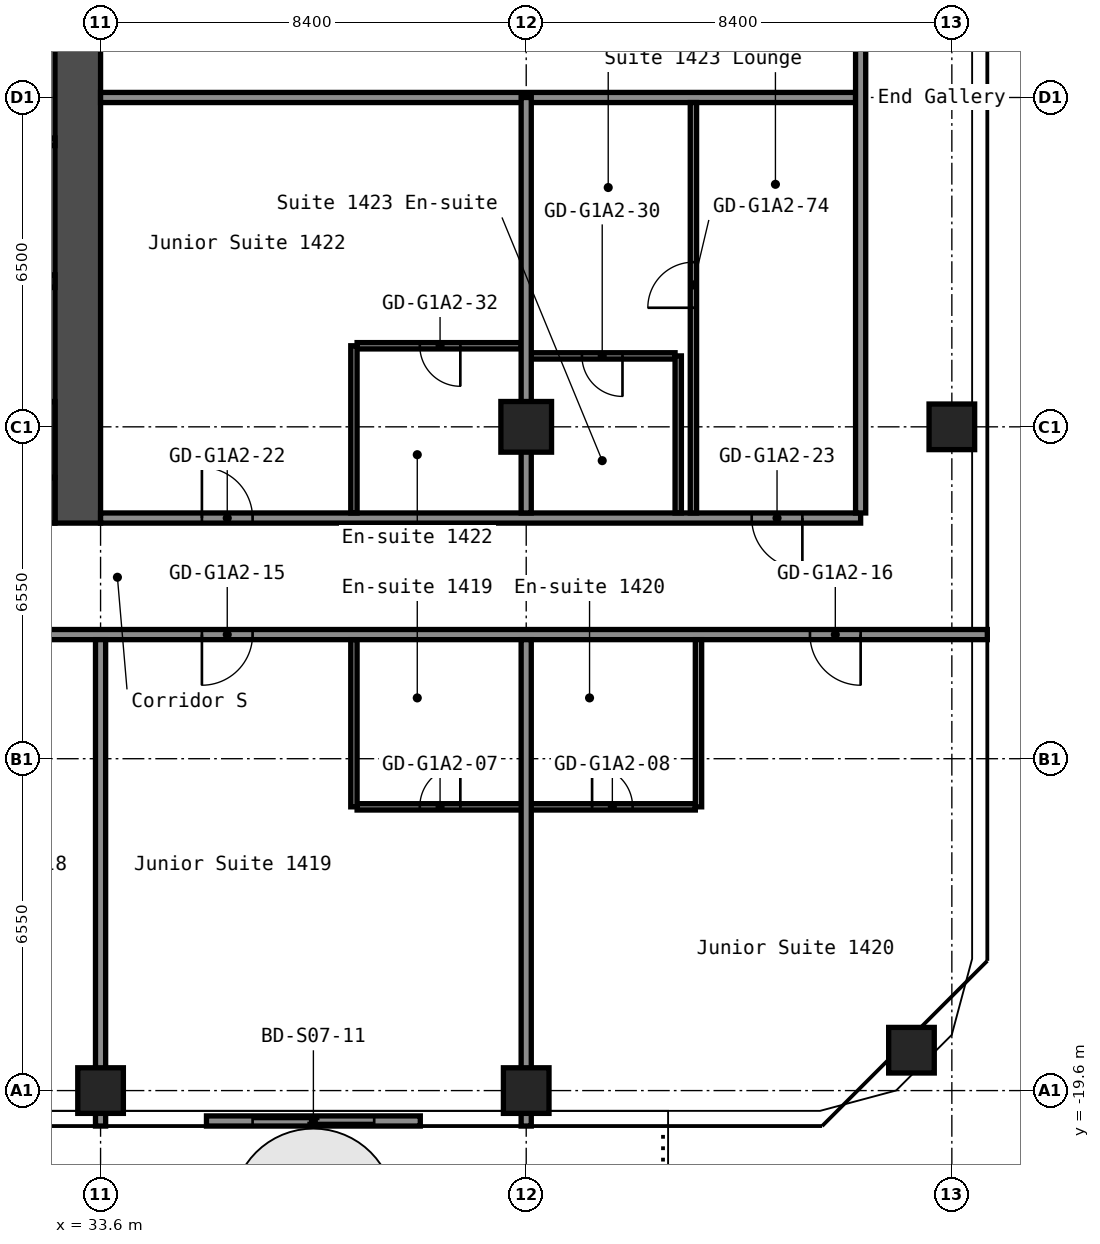
"""IFC4 building model, lengths in metres.
Left out: names, types, materials, properties, quantities, classifications, styles, units other than length and angle.
Written with IfcOpenShell. Run it as: python <this file> out.ifc"""

import sys

from ifc_helpers import new_model, si_unit, direction, frame, frame_2d, origin, origin_2d, place, context, subcontext, project, spatial, rectangle, hollow_rectangle, extrude, element, fill, save


model = new_model("IFC4")
c1 = context("Model", 3, precision=1e-05, world=origin(), true_north=direction((0.0, 1.0)))
c2 = subcontext(c1, "Body", "Model", "MODEL_VIEW")
j1 = project(units=[si_unit("LENGTHUNIT", "METRE"), si_unit("PLANEANGLEUNIT", "RADIAN")], contexts=[c1])
p1 = place(None, origin())
s1 = spatial("IfcSite", under=j1, at=p1, CompositionType="ELEMENT")
p2 = place(p1, origin())
s2 = spatial("IfcBuilding", under=s1, at=p2, CompositionType="ELEMENT")
p3 = place(p2, frame((0.0, 0.0, 51.8)))
s3 = spatial("IfcBuildingStorey", under=s2, at=p3, CompositionType="ELEMENT", Elevation=51.8)
for number, where, z_axis, x_axis in (
    (1, (33.6, -19.6, 0.0), (0.0, 0.0, 1.0), (1.0, 0.0, 0.0)),
    (2, (42.0, -19.6, 0.0), (0.0, 0.0, 1.0), (1.0, 0.0, 0.0)),
):
    element("IfcColumn", number, at=place(p3, frame(where, z_axis=z_axis, x_axis=x_axis)), inside=s3, PredefinedType="COLUMN", context=c2, shape_type="SweptSolid", body=[
        extrude(hollow_rectangle(XDim=0.9, YDim=0.9, WallThickness=0.036, at=origin_2d()), origin(), (0.0, 0.0, 1.0), 2.8),
    ])
p4 = place(p3, frame((42.0, -6.5, 0.0), z_axis=(0.0, 0.0, 1.0), x_axis=(1.0, 0.0, 0.0)))
e3 = element("IfcColumn", 3, at=p4, inside=s3, PredefinedType="COLUMN", context=c2, shape_type="SweptSolid", body=[
    extrude(hollow_rectangle(XDim=1.0, YDim=1.0, WallThickness=0.04, at=origin_2d()), origin(), (0.0, 0.0, 1.0), 2.8),
])
for number, where, z_axis, x_axis in (
    (4, (49.603, -18.803, 0.0), (0.0, 0.0, 1.0), (1.0, 0.0, 0.0)),
    (5, (50.4, -6.5, 0.0), (0.0, 0.0, 1.0), (1.0, 0.0, 0.0)),
):
    element("IfcColumn", number, at=place(p3, frame(where, z_axis=z_axis, x_axis=x_axis)), inside=s3, PredefinedType="COLUMN", context=c2, shape_type="SweptSolid", body=[
        extrude(hollow_rectangle(XDim=0.9, YDim=0.9, WallThickness=0.036, at=origin_2d()), origin(), (0.0, 0.0, 1.0), 2.8),
    ])
p5 = place(p3, frame((33.15, -8.4, 0.0), z_axis=(0.0, 0.0, 1.0), x_axis=(0.0, 1.0, 0.0)))
e6 = element("IfcWall", 6, at=p5, inside=s3, PredefinedType="SHEAR", context=c2, shape_type="SweptSolid", body=[
    extrude(rectangle(XDim=16.8, YDim=0.9, at=frame_2d((8.4, 0.0))), origin(), (0.0, 0.0, 1.0), 2.8),
])
p6 = place(p3, frame((17.7, -7.95, 0.0), z_axis=(0.0, 0.0, 1.0), x_axis=(1.0, 0.0, 0.0)))
e7 = element("IfcWall", 7, at=p6, inside=s3, PredefinedType="SHEAR", context=c2, shape_type="SweptSolid", body=[
    extrude(rectangle(XDim=15.0, YDim=0.9, at=frame_2d((7.5, 0.0))), origin(), (0.0, 0.0, 1.0), 2.8),
])
p7 = place(p6, frame((2.55, 0.0, 0.0)))
e8 = element("IfcOpeningElement", 8, at=p7, cuts=e7, PredefinedType="OPENING", context=c2, shape_type="SweptSolid", body=[
    extrude(rectangle(XDim=1.0, YDim=2.1, at=frame_2d((0.5, 1.05))), frame((0.0, 0.46, 0.0), z_axis=(0.0, -1.0, 0.0), x_axis=(1.0, 0.0, 0.0)), (0.0, 0.0, 1.0), 0.92),
])
p8 = place(p3, frame((28.15, -3.625, 0.0), z_axis=(0.0, 0.0, 1.0), x_axis=(1.0, 0.0, 0.0)))
e9 = element("IfcWall", 9, at=p8, inside=s3, PredefinedType="SHEAR", context=c2, shape_type="SweptSolid", body=[
    extrude(rectangle(XDim=4.55, YDim=0.25, at=frame_2d((2.275, 0.0))), origin(), (0.0, 0.0, 1.0), 2.8),
])
p9 = place(p3, frame((28.15, -6.75, 0.0), z_axis=(0.0, 0.0, 1.0), x_axis=(1.0, 0.0, 0.0)))
e10 = element("IfcWall", 10, at=p9, inside=s3, PredefinedType="SHEAR", context=c2, shape_type="SweptSolid", body=[
    extrude(rectangle(XDim=4.55, YDim=1.5, at=frame_2d((2.275, 0.0))), origin(), (0.0, 0.0, 1.0), 2.8),
])
p10 = place(p3, frame((30.4, -0.875, 0.0), z_axis=(0.0, 0.0, 1.0), x_axis=(1.0, 0.0, 0.0)))
e11 = element("IfcWall", 11, at=p10, inside=s3, PredefinedType="PARTITIONING", context=c2, shape_type="SweptSolid", body=[
    extrude(rectangle(XDim=2.3, YDim=0.15, at=frame_2d((1.15, 0.0))), origin(), (0.0, 0.0, 1.0), 2.8),
])
p11 = place(p3, frame((38.663, -14.0, 0.0), z_axis=(0.0, 0.0, 1.0), x_axis=(1.0, 0.0, 0.0)))
e12 = element("IfcWall", 12, at=p11, inside=s3, PredefinedType="PARTITIONING", context=c2, shape_type="SweptSolid", body=[
    extrude(rectangle(XDim=6.675, YDim=0.125, at=frame_2d((3.337, 0.0))), origin(), (0.0, 0.0, 1.0), 2.8),
])
p12 = place(p11, frame((1.238, 0.0, 0.0)))
e13 = element("IfcOpeningElement", 13, at=p12, cuts=e12, PredefinedType="OPENING", context=c2, shape_type="SweptSolid", body=[
    extrude(rectangle(XDim=0.8, YDim=2.1, at=frame_2d((0.4, 1.05))), frame((0.0, 0.073, 0.0), z_axis=(0.0, -1.0, 0.0), x_axis=(1.0, 0.0, 0.0)), (0.0, 0.0, 1.0), 0.145),
])
p13 = place(p11, frame((4.637, 0.0, 0.0)))
e14 = element("IfcOpeningElement", 14, at=p13, cuts=e12, PredefinedType="OPENING", context=c2, shape_type="SweptSolid", body=[
    extrude(rectangle(XDim=0.8, YDim=2.1, at=frame_2d((0.4, 1.05))), frame((0.0, 0.073, 0.0), z_axis=(0.0, -1.0, 0.0), x_axis=(1.0, 0.0, 0.0)), (0.0, 0.0, 1.0), 0.145),
])
p14 = place(p3, frame((16.8, -10.6, 0.0), z_axis=(0.0, 0.0, 1.0), x_axis=(1.0, 0.0, 0.0)))
e15 = element("IfcWall", 15, at=p14, inside=s3, PredefinedType="PARTITIONING", context=c2, shape_type="SweptSolid", body=[
    extrude(rectangle(XDim=34.3, YDim=0.2, at=frame_2d((17.15, 0.0))), origin(), (0.0, 0.0, 1.0), 2.8),
])
p15 = place(p14, frame((5.4, 0.0, 0.0)))
e16 = element("IfcOpeningElement", 16, at=p15, cuts=e15, PredefinedType="OPENING", context=c2, shape_type="SweptSolid", body=[
    extrude(rectangle(XDim=1.0, YDim=2.1, at=frame_2d((0.5, 1.05))), frame((0.0, 0.11, 0.0), z_axis=(0.0, -1.0, 0.0), x_axis=(1.0, 0.0, 0.0)), (0.0, 0.0, 1.0), 0.22),
])
p16 = place(p14, frame((13.8, 0.0, 0.0)))
e17 = element("IfcOpeningElement", 17, at=p16, cuts=e15, PredefinedType="OPENING", context=c2, shape_type="SweptSolid", body=[
    extrude(rectangle(XDim=1.0, YDim=2.1, at=frame_2d((0.5, 1.05))), frame((0.0, 0.11, 0.0), z_axis=(0.0, -1.0, 0.0), x_axis=(1.0, 0.0, 0.0)), (0.0, 0.0, 1.0), 0.22),
])
p17 = place(p14, frame((18.8, 0.0, 0.0)))
e18 = element("IfcOpeningElement", 18, at=p17, cuts=e15, PredefinedType="OPENING", context=c2, shape_type="SweptSolid", body=[
    extrude(rectangle(XDim=1.0, YDim=2.1, at=frame_2d((0.5, 1.05))), frame((0.0, 0.11, 0.0), z_axis=(0.0, -1.0, 0.0), x_axis=(1.0, 0.0, 0.0)), (0.0, 0.0, 1.0), 0.22),
])
p18 = place(p14, frame((30.8, 0.0, 0.0)))
e19 = element("IfcOpeningElement", 19, at=p18, cuts=e15, PredefinedType="OPENING", context=c2, shape_type="SweptSolid", body=[
    extrude(rectangle(XDim=1.0, YDim=2.1, at=frame_2d((0.5, 1.05))), frame((0.0, 0.11, 0.0), z_axis=(0.0, -1.0, 0.0), x_axis=(1.0, 0.0, 0.0)), (0.0, 0.0, 1.0), 0.22),
])
p19 = place(p3, frame((33.6, -8.3, 0.0), z_axis=(0.0, 0.0, 1.0), x_axis=(1.0, 0.0, 0.0)))
e20 = element("IfcWall", 20, at=p19, inside=s3, PredefinedType="PARTITIONING", context=c2, shape_type="SweptSolid", body=[
    extrude(rectangle(XDim=15.0, YDim=0.2, at=frame_2d((7.5, 0.0))), origin(), (0.0, 0.0, 1.0), 2.8),
])
p20 = place(p19, frame((2.0, 0.0, 0.0)))
e21 = element("IfcOpeningElement", 21, at=p20, cuts=e20, PredefinedType="OPENING", context=c2, shape_type="SweptSolid", body=[
    extrude(rectangle(XDim=1.0, YDim=2.1, at=frame_2d((0.5, 1.05))), frame((0.0, 0.11, 0.0), z_axis=(0.0, -1.0, 0.0), x_axis=(1.0, 0.0, 0.0)), (0.0, 0.0, 1.0), 0.22),
])
p21 = place(p19, frame((12.85, 0.0, 0.0)))
e22 = element("IfcOpeningElement", 22, at=p21, cuts=e20, PredefinedType="OPENING", context=c2, shape_type="SweptSolid", body=[
    extrude(rectangle(XDim=1.0, YDim=2.1, at=frame_2d((0.5, 1.05))), frame((0.0, 0.11, 0.0), z_axis=(0.0, -1.0, 0.0), x_axis=(1.0, 0.0, 0.0)), (0.0, 0.0, 1.0), 0.22),
])
p22 = place(p3, frame((42.1, -5.1, 0.0), z_axis=(0.0, 0.0, 1.0), x_axis=(1.0, 0.0, 0.0)))
e23 = element("IfcWall", 23, at=p22, inside=s3, PredefinedType="PARTITIONING", context=c2, shape_type="SweptSolid", body=[
    extrude(rectangle(XDim=2.837, YDim=0.125, at=frame_2d((1.419, 0.0))), origin(), (0.0, 0.0, 1.0), 2.8),
])
p23 = place(p22, frame((1.0, 0.0, 0.0)))
e24 = element("IfcOpeningElement", 24, at=p23, cuts=e23, PredefinedType="OPENING", context=c2, shape_type="SweptSolid", body=[
    extrude(rectangle(XDim=0.8, YDim=2.1, at=frame_2d((0.4, 1.05))), frame((0.0, 0.073, 0.0), z_axis=(0.0, -1.0, 0.0), x_axis=(1.0, 0.0, 0.0)), (0.0, 0.0, 1.0), 0.145),
])
p24 = place(p3, frame((38.663, -4.9, 0.0), z_axis=(0.0, 0.0, 1.0), x_axis=(1.0, 0.0, 0.0)))
e25 = element("IfcWall", 25, at=p24, inside=s3, PredefinedType="PARTITIONING", context=c2, shape_type="SweptSolid", body=[
    extrude(rectangle(XDim=3.237, YDim=0.125, at=frame_2d((1.619, 0.0))), origin(), (0.0, 0.0, 1.0), 2.8),
])
p25 = place(p24, frame((1.238, 0.0, 0.0)))
e26 = element("IfcOpeningElement", 26, at=p25, cuts=e25, PredefinedType="OPENING", context=c2, shape_type="SweptSolid", body=[
    extrude(rectangle(XDim=0.8, YDim=2.1, at=frame_2d((0.4, 1.05))), frame((0.0, 0.073, 0.0), z_axis=(0.0, -1.0, 0.0), x_axis=(1.0, 0.0, 0.0)), (0.0, 0.0, 1.0), 0.145),
])
p26 = place(p3, frame((33.6, 0.0, 0.0), z_axis=(0.0, 0.0, 1.0), x_axis=(1.0, 0.0, 0.0)))
e27 = element("IfcWall", 27, at=p26, inside=s3, PredefinedType="PARTITIONING", context=c2, shape_type="SweptSolid", body=[
    extrude(rectangle(XDim=14.9, YDim=0.2, at=frame_2d((7.45, 0.0))), origin(), (0.0, 0.0, 1.0), 2.8),
])
p27 = place(p3, frame((33.6, -20.3, 0.0), z_axis=(0.0, 0.0, 1.0), x_axis=(0.0, 1.0, 0.0)))
e28 = element("IfcWall", 28, at=p27, inside=s3, PredefinedType="PARTITIONING", context=c2, shape_type="SweptSolid", body=[
    extrude(rectangle(XDim=9.6, YDim=0.2, at=frame_2d((4.8, 0.0))), origin(), (0.0, 0.0, 1.0), 2.8),
])
for number, where, z_axis, x_axis in (
    (29, (38.6, -14.0, 0.0), (0.0, 0.0, 1.0), (0.0, 1.0, 0.0)),
    (30, (38.6, -8.2, 0.0), (0.0, 0.0, 1.0), (0.0, 1.0, 0.0)),
):
    element("IfcWall", number, at=place(p3, frame(where, z_axis=z_axis, x_axis=x_axis)), inside=s3, PredefinedType="PARTITIONING", context=c2, shape_type="SweptSolid", body=[
        extrude(rectangle(XDim=3.3, YDim=0.125, at=frame_2d((1.65, 0.0))), origin(), (0.0, 0.0, 1.0), 2.8),
    ])
p28 = place(p3, frame((42.0, -20.3, 0.0), z_axis=(0.0, 0.0, 1.0), x_axis=(0.0, 1.0, 0.0)))
e31 = element("IfcWall", 31, at=p28, inside=s3, PredefinedType="PARTITIONING", context=c2, shape_type="SweptSolid", body=[
    extrude(rectangle(XDim=9.6, YDim=0.2, at=frame_2d((4.8, 0.0))), origin(), (0.0, 0.0, 1.0), 2.8),
])
p29 = place(p3, frame((42.0, -8.2, 0.0), z_axis=(0.0, 0.0, 1.0), x_axis=(0.0, 1.0, 0.0)))
e32 = element("IfcWall", 32, at=p29, inside=s3, PredefinedType="PARTITIONING", context=c2, shape_type="SweptSolid", body=[
    extrude(rectangle(XDim=8.2, YDim=0.2, at=frame_2d((4.1, 0.0))), origin(), (0.0, 0.0, 1.0), 2.8),
])
p30 = place(p3, frame((45.0, -8.2, 0.0), z_axis=(0.0, 0.0, 1.0), x_axis=(0.0, 1.0, 0.0)))
e33 = element("IfcWall", 33, at=p30, inside=s3, PredefinedType="PARTITIONING", context=c2, shape_type="SweptSolid", body=[
    extrude(rectangle(XDim=3.1, YDim=0.125, at=frame_2d((1.55, 0.0))), origin(), (0.0, 0.0, 1.0), 2.8),
])
p31 = place(p3, frame((45.3, -8.2, 0.0), z_axis=(0.0, 0.0, 1.0), x_axis=(0.0, 1.0, 0.0)))
e34 = element("IfcWall", 34, at=p31, inside=s3, PredefinedType="PARTITIONING", context=c2, shape_type="SweptSolid", body=[
    extrude(rectangle(XDim=8.1, YDim=0.125, at=frame_2d((4.05, 0.0))), origin(), (0.0, 0.0, 1.0), 2.8),
])
p32 = place(p31, frame((4.05, 0.0, 0.0)))
e35 = element("IfcOpeningElement", 35, at=p32, cuts=e34, PredefinedType="OPENING", context=c2, shape_type="SweptSolid", body=[
    extrude(rectangle(XDim=0.9, YDim=2.1, at=frame_2d((0.45, 1.05))), frame((0.0, 0.073, 0.0), z_axis=(0.0, -1.0, 0.0), x_axis=(1.0, 0.0, 0.0)), (0.0, 0.0, 1.0), 0.145),
])
p33 = place(p3, frame((45.4, -14.0, 0.0), z_axis=(0.0, 0.0, 1.0), x_axis=(0.0, 1.0, 0.0)))
e36 = element("IfcWall", 36, at=p33, inside=s3, PredefinedType="PARTITIONING", context=c2, shape_type="SweptSolid", body=[
    extrude(rectangle(XDim=3.3, YDim=0.125, at=frame_2d((1.65, 0.0))), origin(), (0.0, 0.0, 1.0), 2.8),
])
p34 = place(p3, frame((48.6, -8.2, 0.0), z_axis=(0.0, 0.0, 1.0), x_axis=(0.0, 1.0, 0.0)))
e37 = element("IfcWall", 37, at=p34, inside=s3, PredefinedType="PARTITIONING", context=c2, shape_type="SweptSolid", body=[
    extrude(rectangle(XDim=16.4, YDim=0.2, at=frame_2d((8.2, 0.0))), origin(), (0.0, 0.0, 1.0), 2.8),
])
p35 = place(p3, frame((35.69, -20.2, 0.0), z_axis=(0.0, 0.0, 1.0), x_axis=(1.0, 0.0, 0.0)))
p36 = place(p35, frame((0.91, 0.0, 0.0)))
p37 = place(p36, frame((2.4, 0.0, 0.0), z_axis=(0.0, 0.0, 1.0), x_axis=(-1.0, 0.0, 0.0)))
e38 = element("IfcDoor", 38, at=p37, inside=s3, OperationType="SLIDING_TO_LEFT", PredefinedType="DOOR", context=c2, shape_type="SweptSolid", body=[
    extrude(rectangle(XDim=2.4, YDim=2.2, at=frame_2d((1.2, 1.1))), frame((0.0, 0.025, 0.0), z_axis=(0.0, -1.0, 0.0), x_axis=(1.0, 0.0, 0.0)), (0.0, 0.0, 1.0), 0.05),
])
p38 = place(p12, origin())
e39 = element("IfcDoor", 39, at=p38, inside=s3, OperationType="SINGLE_SWING_LEFT", PredefinedType="DOOR", context=c2, shape_type="SweptSolid", body=[
    extrude(rectangle(XDim=0.8, YDim=2.1, at=frame_2d((0.4, 1.05))), frame((0.0, 0.025, 0.0), z_axis=(0.0, -1.0, 0.0), x_axis=(1.0, 0.0, 0.0)), (0.0, 0.0, 1.0), 0.05),
])
fill(e13, e39)
p39 = place(p13, origin())
e40 = element("IfcDoor", 40, at=p39, inside=s3, OperationType="SINGLE_SWING_RIGHT", PredefinedType="DOOR", context=c2, shape_type="SweptSolid", body=[
    extrude(rectangle(XDim=0.8, YDim=2.1, at=frame_2d((0.4, 1.05))), frame((0.0, 0.025, 0.0), z_axis=(0.0, -1.0, 0.0), x_axis=(1.0, 0.0, 0.0)), (0.0, 0.0, 1.0), 0.05),
])
fill(e14, e40)
p40 = place(p17, origin())
e41 = element("IfcDoor", 41, at=p40, inside=s3, OperationType="SINGLE_SWING_LEFT", PredefinedType="DOOR", context=c2, shape_type="SweptSolid", body=[
    extrude(rectangle(XDim=1.0, YDim=2.1, at=frame_2d((0.5, 1.05))), frame((0.0, 0.025, 0.0), z_axis=(0.0, -1.0, 0.0), x_axis=(1.0, 0.0, 0.0)), (0.0, 0.0, 1.0), 0.05),
])
fill(e18, e41)
p41 = place(p18, origin())
e42 = element("IfcDoor", 42, at=p41, inside=s3, OperationType="SINGLE_SWING_RIGHT", PredefinedType="DOOR", context=c2, shape_type="SweptSolid", body=[
    extrude(rectangle(XDim=1.0, YDim=2.1, at=frame_2d((0.5, 1.05))), frame((0.0, 0.025, 0.0), z_axis=(0.0, -1.0, 0.0), x_axis=(1.0, 0.0, 0.0)), (0.0, 0.0, 1.0), 0.05),
])
fill(e19, e42)
p42 = place(p20, origin())
e43 = element("IfcDoor", 43, at=p42, inside=s3, OperationType="SINGLE_SWING_RIGHT", PredefinedType="DOOR", context=c2, shape_type="SweptSolid", body=[
    extrude(rectangle(XDim=1.0, YDim=2.1, at=frame_2d((0.5, 1.05))), frame((0.0, 0.025, 0.0), z_axis=(0.0, -1.0, 0.0), x_axis=(1.0, 0.0, 0.0)), (0.0, 0.0, 1.0), 0.05),
])
fill(e21, e43)
p43 = place(p21, origin())
e44 = element("IfcDoor", 44, at=p43, inside=s3, OperationType="SINGLE_SWING_RIGHT", PredefinedType="DOOR", context=c2, shape_type="SweptSolid", body=[
    extrude(rectangle(XDim=1.0, YDim=2.1, at=frame_2d((0.5, 1.05))), frame((0.0, 0.025, 0.0), z_axis=(0.0, -1.0, 0.0), x_axis=(1.0, 0.0, 0.0)), (0.0, 0.0, 1.0), 0.05),
])
fill(e22, e44)
p44 = place(p23, origin())
e45 = element("IfcDoor", 45, at=p44, inside=s3, OperationType="SINGLE_SWING_RIGHT", PredefinedType="DOOR", context=c2, shape_type="SweptSolid", body=[
    extrude(rectangle(XDim=0.8, YDim=2.1, at=frame_2d((0.4, 1.05))), frame((0.0, 0.025, 0.0), z_axis=(0.0, -1.0, 0.0), x_axis=(1.0, 0.0, 0.0)), (0.0, 0.0, 1.0), 0.05),
])
fill(e24, e45)
p45 = place(p25, origin())
e46 = element("IfcDoor", 46, at=p45, inside=s3, OperationType="SINGLE_SWING_RIGHT", PredefinedType="DOOR", context=c2, shape_type="SweptSolid", body=[
    extrude(rectangle(XDim=0.8, YDim=2.1, at=frame_2d((0.4, 1.05))), frame((0.0, 0.025, 0.0), z_axis=(0.0, -1.0, 0.0), x_axis=(1.0, 0.0, 0.0)), (0.0, 0.0, 1.0), 0.05),
])
fill(e26, e46)
p46 = place(p32, origin())
e47 = element("IfcDoor", 47, at=p46, inside=s3, OperationType="SINGLE_SWING_RIGHT", PredefinedType="DOOR", context=c2, shape_type="SweptSolid", body=[
    extrude(rectangle(XDim=0.9, YDim=2.1, at=frame_2d((0.45, 1.05))), frame((0.0, 0.025, 0.0), z_axis=(0.0, -1.0, 0.0), x_axis=(1.0, 0.0, 0.0)), (0.0, 0.0, 1.0), 0.05),
])
fill(e35, e47)
save(model, sys.argv[1])
